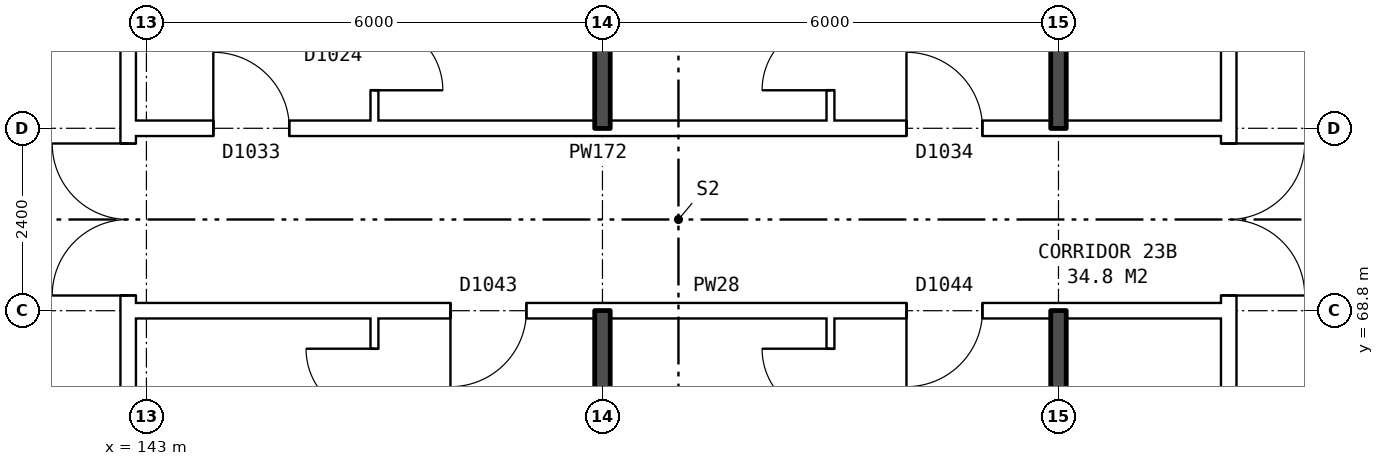
"""IFC4 building model, lengths in metres.
Left out: names, types, materials, properties, quantities, classifications, styles, units other than length and angle.
Written with IfcOpenShell. Run it as: python <this file> out.ifc"""

import sys

from ifc_helpers import new_model, si_unit, direction, frame, frame_2d, origin, place, context, subcontext, project, spatial, rectangle, extrude, element, fill, save


model = new_model("IFC4")
c1 = context("Model", 3, precision=1e-05, world=origin(), true_north=direction((0.0, 1.0)))
c2 = subcontext(c1, "Body", "Model", "MODEL_VIEW")
j1 = project(units=[si_unit("LENGTHUNIT", "METRE"), si_unit("PLANEANGLEUNIT", "RADIAN")], contexts=[c1])
p1 = place(None, origin())
s1 = spatial("IfcSite", under=j1, at=p1, CompositionType="ELEMENT")
p2 = place(p1, origin())
s2 = spatial("IfcBuilding", under=s1, at=p2, CompositionType="ELEMENT")
p3 = place(p2, frame((0.0, 0.0, 84.0)))
s3 = spatial("IfcBuildingStorey", under=s2, at=p3, CompositionType="ELEMENT", Elevation=84.0)
p4 = place(p3, frame((142.76, 63.9, 0.0), z_axis=(0.0, 0.0, 1.0), x_axis=(0.0, 1.0, 0.0)))
e1 = element("IfcWall", 1, at=p4, inside=s3, PredefinedType="PARTITIONING", context=c2, shape_type="SweptSolid", body=[
    extrude(rectangle(XDim=12.2, YDim=0.2, at=frame_2d((6.1, 0.0))), origin(), (0.0, 0.0, 1.0), 2.85),
])
p5 = place(p4, frame((5.1, 0.0, 0.0)))
e2 = element("IfcOpeningElement", 2, at=p5, cuts=e1, PredefinedType="OPENING", context=c2, shape_type="SweptSolid", body=[
    extrude(rectangle(XDim=2.0, YDim=2.1, at=frame_2d((1.0, 1.05))), frame((0.0, 0.11, 0.0), z_axis=(0.0, -1.0, 0.0), x_axis=(1.0, 0.0, 0.0)), (0.0, 0.0, 1.0), 0.22),
])
p6 = place(p3, frame((157.24, 63.9, 0.0), z_axis=(0.0, 0.0, 1.0), x_axis=(0.0, 1.0, 0.0)))
e3 = element("IfcWall", 3, at=p6, inside=s3, PredefinedType="PARTITIONING", context=c2, shape_type="SweptSolid", body=[
    extrude(rectangle(XDim=12.2, YDim=0.2, at=frame_2d((6.1, 0.0))), origin(), (0.0, 0.0, 1.0), 2.85),
])
p7 = place(p6, frame((5.1, 0.0, 0.0)))
e4 = element("IfcOpeningElement", 4, at=p7, cuts=e3, PredefinedType="OPENING", context=c2, shape_type="SweptSolid", body=[
    extrude(rectangle(XDim=2.0, YDim=2.1, at=frame_2d((1.0, 1.05))), frame((0.0, 0.11, 0.0), z_axis=(0.0, -1.0, 0.0), x_axis=(1.0, 0.0, 0.0)), (0.0, 0.0, 1.0), 0.22),
])
p8 = place(p3, frame((142.76, 68.8, 0.0), z_axis=(0.0, 0.0, 1.0), x_axis=(1.0, 0.0, 0.0)))
e5 = element("IfcWall", 5, at=p8, inside=s3, PredefinedType="PARTITIONING", context=c2, shape_type="SweptSolid", body=[
    extrude(rectangle(XDim=14.48, YDim=0.2, at=frame_2d((7.24, 0.0))), origin(), (0.0, 0.0, 1.0), 2.85),
])
p9 = place(p8, frame((4.24, 0.0, 0.0)))
e6 = element("IfcOpeningElement", 6, at=p9, cuts=e5, PredefinedType="OPENING", context=c2, shape_type="SweptSolid", body=[
    extrude(rectangle(XDim=1.0, YDim=2.1, at=frame_2d((0.5, 1.05))), frame((0.0, 0.11, 0.0), z_axis=(0.0, -1.0, 0.0), x_axis=(1.0, 0.0, 0.0)), (0.0, 0.0, 1.0), 0.22),
])
p10 = place(p8, frame((10.24, 0.0, 0.0)))
e7 = element("IfcOpeningElement", 7, at=p10, cuts=e5, PredefinedType="OPENING", context=c2, shape_type="SweptSolid", body=[
    extrude(rectangle(XDim=1.0, YDim=2.1, at=frame_2d((0.5, 1.05))), frame((0.0, 0.11, 0.0), z_axis=(0.0, -1.0, 0.0), x_axis=(1.0, 0.0, 0.0)), (0.0, 0.0, 1.0), 0.22),
])
p11 = place(p3, frame((142.76, 71.2, 0.0), z_axis=(0.0, 0.0, 1.0), x_axis=(1.0, 0.0, 0.0)))
e8 = element("IfcWall", 8, at=p11, inside=s3, PredefinedType="PARTITIONING", context=c2, shape_type="SweptSolid", body=[
    extrude(rectangle(XDim=14.48, YDim=0.2, at=frame_2d((7.24, 0.0))), origin(), (0.0, 0.0, 1.0), 2.85),
])
p12 = place(p11, frame((1.12, 0.0, 0.0)))
e9 = element("IfcOpeningElement", 9, at=p12, cuts=e8, PredefinedType="OPENING", context=c2, shape_type="SweptSolid", body=[
    extrude(rectangle(XDim=1.0, YDim=2.1, at=frame_2d((0.5, 1.05))), frame((0.0, 0.11, 0.0), z_axis=(0.0, -1.0, 0.0), x_axis=(1.0, 0.0, 0.0)), (0.0, 0.0, 1.0), 0.22),
])
p13 = place(p11, frame((10.24, 0.0, 0.0)))
e10 = element("IfcOpeningElement", 10, at=p13, cuts=e8, PredefinedType="OPENING", context=c2, shape_type="SweptSolid", body=[
    extrude(rectangle(XDim=1.0, YDim=2.1, at=frame_2d((0.5, 1.05))), frame((0.0, 0.11, 0.0), z_axis=(0.0, -1.0, 0.0), x_axis=(1.0, 0.0, 0.0)), (0.0, 0.0, 1.0), 0.22),
])
p14 = place(p3, frame((146.0, 54.36, 0.0), z_axis=(0.0, 0.0, 1.0), x_axis=(0.0, 1.0, 0.0)))
e11 = element("IfcWall", 11, at=p14, inside=s3, PredefinedType="PARTITIONING", context=c2, shape_type="SweptSolid", body=[
    extrude(rectangle(XDim=14.34, YDim=0.1, at=frame_2d((7.17, 0.0))), origin(), (0.0, 0.0, 1.0), 2.85),
])
p15 = place(p14, frame((6.7, 0.0, 0.0)))
e12 = element("IfcOpeningElement", 12, at=p15, cuts=e11, PredefinedType="OPENING", context=c2, shape_type="SweptSolid", body=[
    extrude(rectangle(XDim=0.9, YDim=2.1, at=frame_2d((0.45, 1.05))), frame((0.0, 0.06, 0.0), z_axis=(0.0, -1.0, 0.0), x_axis=(1.0, 0.0, 0.0)), (0.0, 0.0, 1.0), 0.12),
])
p16 = place(p14, frame((13.04, 0.0, 0.0)))
e13 = element("IfcOpeningElement", 13, at=p16, cuts=e11, PredefinedType="OPENING", context=c2, shape_type="SweptSolid", body=[
    extrude(rectangle(XDim=0.9, YDim=2.1, at=frame_2d((0.45, 1.05))), frame((0.0, 0.06, 0.0), z_axis=(0.0, -1.0, 0.0), x_axis=(1.0, 0.0, 0.0)), (0.0, 0.0, 1.0), 0.12),
])
p17 = place(p3, frame((146.0, 71.3, 0.0), z_axis=(0.0, 0.0, 1.0), x_axis=(0.0, 1.0, 0.0)))
e14 = element("IfcWall", 14, at=p17, inside=s3, PredefinedType="PARTITIONING", context=c2, shape_type="SweptSolid", body=[
    extrude(rectangle(XDim=14.34, YDim=0.1, at=frame_2d((7.17, 0.0))), origin(), (0.0, 0.0, 1.0), 2.85),
])
p18 = place(p17, frame((5.74, 0.0, 0.0)))
e15 = element("IfcOpeningElement", 15, at=p18, cuts=e14, PredefinedType="OPENING", context=c2, shape_type="SweptSolid", body=[
    extrude(rectangle(XDim=0.9, YDim=2.1, at=frame_2d((0.45, 1.05))), frame((0.0, 0.06, 0.0), z_axis=(0.0, -1.0, 0.0), x_axis=(1.0, 0.0, 0.0)), (0.0, 0.0, 1.0), 0.12),
])
p19 = place(p17, frame((0.4, 0.0, 0.0)))
e16 = element("IfcOpeningElement", 16, at=p19, cuts=e14, PredefinedType="OPENING", context=c2, shape_type="SweptSolid", body=[
    extrude(rectangle(XDim=0.9, YDim=2.1, at=frame_2d((0.45, 1.05))), frame((0.0, 0.06, 0.0), z_axis=(0.0, -1.0, 0.0), x_axis=(1.0, 0.0, 0.0)), (0.0, 0.0, 1.0), 0.12),
])
for number, where, z_axis, x_axis in (
    (17, (149.0, 54.36, 0.0), (0.0, 0.0, 1.0), (0.0, 1.0, 0.0)),
    (18, (149.0, 71.2, 0.0), (0.0, 0.0, 1.0), (0.0, 1.0, 0.0)),
):
    element("IfcWall", number, at=place(p3, frame(where, z_axis=z_axis, x_axis=x_axis)), inside=s3, PredefinedType="SOLIDWALL", context=c2, shape_type="SweptSolid", body=[
        extrude(rectangle(XDim=14.44, YDim=0.2, at=frame_2d((7.22, 0.0))), origin(), (0.0, 0.0, 1.0), 2.85),
    ])
p20 = place(p3, frame((152.0, 54.36, 0.0), z_axis=(0.0, 0.0, 1.0), x_axis=(0.0, 1.0, 0.0)))
e19 = element("IfcWall", 19, at=p20, inside=s3, PredefinedType="PARTITIONING", context=c2, shape_type="SweptSolid", body=[
    extrude(rectangle(XDim=14.34, YDim=0.1, at=frame_2d((7.17, 0.0))), origin(), (0.0, 0.0, 1.0), 2.85),
])
p21 = place(p20, frame((6.7, 0.0, 0.0)))
e20 = element("IfcOpeningElement", 20, at=p21, cuts=e19, PredefinedType="OPENING", context=c2, shape_type="SweptSolid", body=[
    extrude(rectangle(XDim=0.9, YDim=2.1, at=frame_2d((0.45, 1.05))), frame((0.0, 0.06, 0.0), z_axis=(0.0, -1.0, 0.0), x_axis=(1.0, 0.0, 0.0)), (0.0, 0.0, 1.0), 0.12),
])
p22 = place(p20, frame((13.04, 0.0, 0.0)))
e21 = element("IfcOpeningElement", 21, at=p22, cuts=e19, PredefinedType="OPENING", context=c2, shape_type="SweptSolid", body=[
    extrude(rectangle(XDim=0.9, YDim=2.1, at=frame_2d((0.45, 1.05))), frame((0.0, 0.06, 0.0), z_axis=(0.0, -1.0, 0.0), x_axis=(1.0, 0.0, 0.0)), (0.0, 0.0, 1.0), 0.12),
])
p23 = place(p3, frame((152.0, 71.3, 0.0), z_axis=(0.0, 0.0, 1.0), x_axis=(0.0, 1.0, 0.0)))
e22 = element("IfcWall", 22, at=p23, inside=s3, PredefinedType="PARTITIONING", context=c2, shape_type="SweptSolid", body=[
    extrude(rectangle(XDim=14.34, YDim=0.1, at=frame_2d((7.17, 0.0))), origin(), (0.0, 0.0, 1.0), 2.85),
])
p24 = place(p23, frame((9.24, 0.0, 0.0)))
e23 = element("IfcOpeningElement", 23, at=p24, cuts=e22, PredefinedType="OPENING", context=c2, shape_type="SweptSolid", body=[
    extrude(rectangle(XDim=0.9, YDim=2.1, at=frame_2d((0.45, 1.05))), frame((0.0, 0.06, 0.0), z_axis=(0.0, -1.0, 0.0), x_axis=(1.0, 0.0, 0.0)), (0.0, 0.0, 1.0), 0.12),
])
p25 = place(p23, frame((0.4, 0.0, 0.0)))
e24 = element("IfcOpeningElement", 24, at=p25, cuts=e22, PredefinedType="OPENING", context=c2, shape_type="SweptSolid", body=[
    extrude(rectangle(XDim=0.9, YDim=2.1, at=frame_2d((0.45, 1.05))), frame((0.0, 0.06, 0.0), z_axis=(0.0, -1.0, 0.0), x_axis=(1.0, 0.0, 0.0)), (0.0, 0.0, 1.0), 0.12),
])
for number, where, z_axis, x_axis in (
    (25, (155.0, 63.8, 0.0), (0.0, 0.0, 1.0), (0.0, 1.0, 0.0)),
    (26, (155.0, 71.2, 0.0), (0.0, 0.0, 1.0), (0.0, 1.0, 0.0)),
):
    element("IfcWall", number, at=place(p3, frame(where, z_axis=z_axis, x_axis=x_axis)), inside=s3, PredefinedType="SOLIDWALL", context=c2, shape_type="SweptSolid", body=[
        extrude(rectangle(XDim=5.0, YDim=0.2, at=frame_2d((2.5, 0.0))), origin(), (0.0, 0.0, 1.0), 2.85),
    ])
p26 = place(p5, origin())
e27 = element("IfcDoor", 27, at=p26, inside=s3, OperationType="DOUBLE_DOOR_SINGLE_SWING", PredefinedType="DOOR", context=c2, shape_type="SweptSolid", body=[
    extrude(rectangle(XDim=2.0, YDim=2.1, at=frame_2d((1.0, 1.05))), frame((0.0, 0.025, 0.0), z_axis=(0.0, -1.0, 0.0), x_axis=(1.0, 0.0, 0.0)), (0.0, 0.0, 1.0), 0.05),
])
fill(e2, e27)
p27 = place(p7, frame((2.0, 0.0, 0.0), z_axis=(0.0, 0.0, 1.0), x_axis=(-1.0, 0.0, 0.0)))
e28 = element("IfcDoor", 28, at=p27, inside=s3, OperationType="DOUBLE_DOOR_SINGLE_SWING", PredefinedType="DOOR", context=c2, shape_type="SweptSolid", body=[
    extrude(rectangle(XDim=2.0, YDim=2.1, at=frame_2d((1.0, 1.05))), frame((0.0, 0.025, 0.0), z_axis=(0.0, -1.0, 0.0), x_axis=(1.0, 0.0, 0.0)), (0.0, 0.0, 1.0), 0.05),
])
fill(e4, e28)
p28 = place(p9, frame((1.0, 0.0, 0.0), z_axis=(0.0, 0.0, 1.0), x_axis=(-1.0, 0.0, 0.0)))
e29 = element("IfcDoor", 29, at=p28, inside=s3, OperationType="SINGLE_SWING_RIGHT", PredefinedType="DOOR", context=c2, shape_type="SweptSolid", body=[
    extrude(rectangle(XDim=1.0, YDim=2.1, at=frame_2d((0.5, 1.05))), frame((0.0, 0.025, 0.0), z_axis=(0.0, -1.0, 0.0), x_axis=(1.0, 0.0, 0.0)), (0.0, 0.0, 1.0), 0.05),
])
fill(e6, e29)
p29 = place(p16, origin())
e30 = element("IfcDoor", 30, at=p29, inside=s3, OperationType="SINGLE_SWING_RIGHT", PredefinedType="DOOR", context=c2, shape_type="SweptSolid", body=[
    extrude(rectangle(XDim=0.9, YDim=2.1, at=frame_2d((0.45, 1.05))), frame((0.0, 0.025, 0.0), z_axis=(0.0, -1.0, 0.0), x_axis=(1.0, 0.0, 0.0)), (0.0, 0.0, 1.0), 0.05),
])
fill(e13, e30)
p30 = place(p10, frame((1.0, 0.0, 0.0), z_axis=(0.0, 0.0, 1.0), x_axis=(-1.0, 0.0, 0.0)))
e31 = element("IfcDoor", 31, at=p30, inside=s3, OperationType="SINGLE_SWING_RIGHT", PredefinedType="DOOR", context=c2, shape_type="SweptSolid", body=[
    extrude(rectangle(XDim=1.0, YDim=2.1, at=frame_2d((0.5, 1.05))), frame((0.0, 0.025, 0.0), z_axis=(0.0, -1.0, 0.0), x_axis=(1.0, 0.0, 0.0)), (0.0, 0.0, 1.0), 0.05),
])
fill(e7, e31)
p31 = place(p22, origin())
e32 = element("IfcDoor", 32, at=p31, inside=s3, OperationType="SINGLE_SWING_RIGHT", PredefinedType="DOOR", context=c2, shape_type="SweptSolid", body=[
    extrude(rectangle(XDim=0.9, YDim=2.1, at=frame_2d((0.45, 1.05))), frame((0.0, 0.025, 0.0), z_axis=(0.0, -1.0, 0.0), x_axis=(1.0, 0.0, 0.0)), (0.0, 0.0, 1.0), 0.05),
])
fill(e21, e32)
p32 = place(p12, origin())
e33 = element("IfcDoor", 33, at=p32, inside=s3, OperationType="SINGLE_SWING_LEFT", PredefinedType="DOOR", context=c2, shape_type="SweptSolid", body=[
    extrude(rectangle(XDim=1.0, YDim=2.1, at=frame_2d((0.5, 1.05))), frame((0.0, 0.025, 0.0), z_axis=(0.0, -1.0, 0.0), x_axis=(1.0, 0.0, 0.0)), (0.0, 0.0, 1.0), 0.05),
])
fill(e9, e33)
p33 = place(p19, frame((0.9, 0.0, 0.0), z_axis=(0.0, 0.0, 1.0), x_axis=(-1.0, 0.0, 0.0)))
e34 = element("IfcDoor", 34, at=p33, inside=s3, OperationType="SINGLE_SWING_RIGHT", PredefinedType="DOOR", context=c2, shape_type="SweptSolid", body=[
    extrude(rectangle(XDim=0.9, YDim=2.1, at=frame_2d((0.45, 1.05))), frame((0.0, 0.025, 0.0), z_axis=(0.0, -1.0, 0.0), x_axis=(1.0, 0.0, 0.0)), (0.0, 0.0, 1.0), 0.05),
])
fill(e16, e34)
p34 = place(p13, origin())
e35 = element("IfcDoor", 35, at=p34, inside=s3, OperationType="SINGLE_SWING_LEFT", PredefinedType="DOOR", context=c2, shape_type="SweptSolid", body=[
    extrude(rectangle(XDim=1.0, YDim=2.1, at=frame_2d((0.5, 1.05))), frame((0.0, 0.025, 0.0), z_axis=(0.0, -1.0, 0.0), x_axis=(1.0, 0.0, 0.0)), (0.0, 0.0, 1.0), 0.05),
])
fill(e10, e35)
p35 = place(p25, origin())
e36 = element("IfcDoor", 36, at=p35, inside=s3, OperationType="SINGLE_SWING_LEFT", PredefinedType="DOOR", context=c2, shape_type="SweptSolid", body=[
    extrude(rectangle(XDim=0.9, YDim=2.1, at=frame_2d((0.45, 1.05))), frame((0.0, 0.025, 0.0), z_axis=(0.0, -1.0, 0.0), x_axis=(1.0, 0.0, 0.0)), (0.0, 0.0, 1.0), 0.05),
])
fill(e24, e36)
save(model, sys.argv[1])
